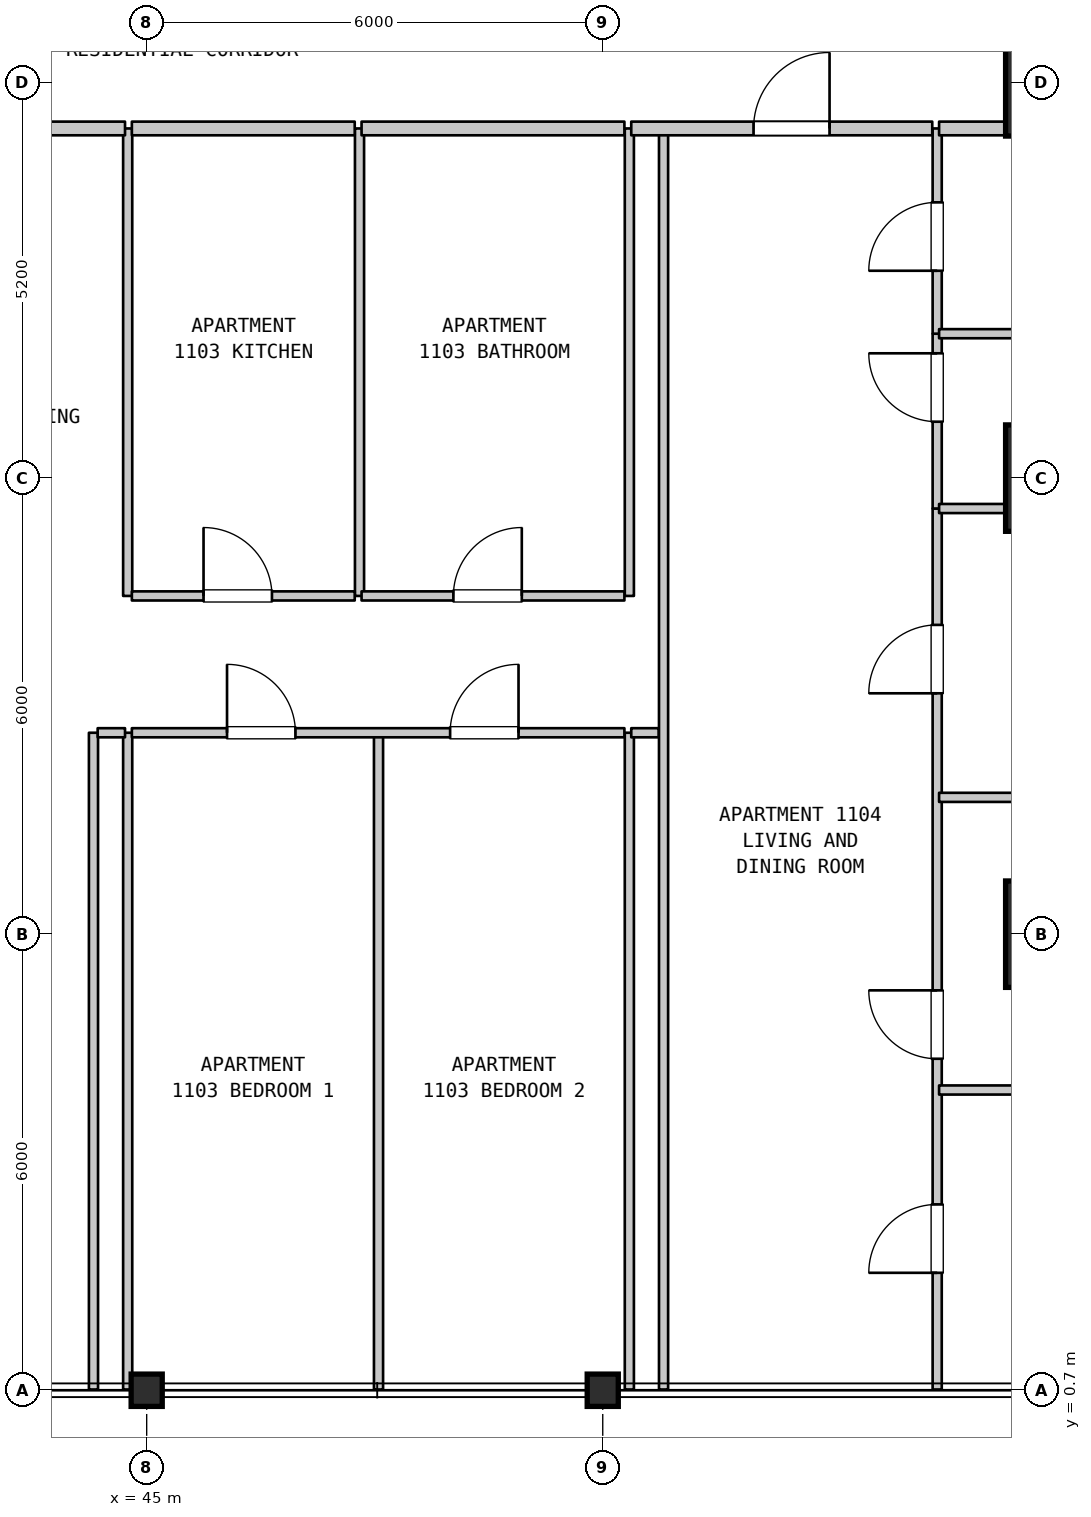
"""IFC4 building model, lengths in metres.
Left out: names, types, materials, properties, quantities, classifications, styles, units other than length and angle.
Written with IfcOpenShell. Run it as: python <this file> out.ifc"""

import sys

from ifc_helpers import new_model, si_unit, direction, frame, frame_2d, origin, origin_2d, place, context, subcontext, project, spatial, rectangle, i_section, extrude, element, fill, save


model = new_model("IFC4")
c1 = context("Model", 3, precision=1e-05, world=origin(), true_north=direction((0.0, 1.0)))
c2 = subcontext(c1, "Body", "Model", "MODEL_VIEW")
j1 = project(units=[si_unit("LENGTHUNIT", "METRE"), si_unit("PLANEANGLEUNIT", "RADIAN")], contexts=[c1])
p1 = place(None, origin())
s1 = spatial("IfcSite", under=j1, at=p1, CompositionType="ELEMENT")
p2 = place(p1, origin())
s2 = spatial("IfcBuilding", under=s1, at=p2, CompositionType="ELEMENT")
p3 = place(p2, frame((0.0, 0.0, 49.9)))
s3 = spatial("IfcBuildingStorey", under=s2, at=p3, CompositionType="ELEMENT", Elevation=49.9)
for number, where, z_axis, x_axis in (
    (1, (45.0, 0.7, 0.0), (0.0, 0.0, 1.0), (1.0, 0.0, 0.0)),
    (2, (51.0, 0.7, 0.0), (0.0, 0.0, 1.0), (1.0, 0.0, 0.0)),
):
    element("IfcColumn", number, at=place(p3, frame(where, z_axis=z_axis, x_axis=x_axis)), inside=s3, PredefinedType="COLUMN", context=c2, shape_type="SweptSolid", body=[
        extrude(i_section(OverallWidth=0.409, OverallDepth=0.425, WebThickness=0.032, FlangeThickness=0.052, FilletRadius=0.015, at=origin_2d()), origin(), (0.0, 0.0, 1.0), 3.7),
    ])
for number, where, z_axis, x_axis in (
    (3, (57.0, 6.7, 0.0), (0.0, 0.0, 1.0), (1.0, 0.0, 0.0)),
    (4, (57.0, 12.7, 0.0), (0.0, 0.0, 1.0), (1.0, 0.0, 0.0)),
    (5, (57.0, 17.9, 0.0), (0.0, 0.0, 1.0), (1.0, 0.0, 0.0)),
):
    element("IfcColumn", number, at=place(p3, frame(where, z_axis=z_axis, x_axis=x_axis)), inside=s3, PredefinedType="COLUMN", context=c2, shape_type="SweptSolid", body=[
        extrude(rectangle(XDim=1.4, YDim=1.4, at=origin_2d()), origin(), (0.0, 0.0, 1.0), 3.7),
    ])
for number, where, z_axis, x_axis in (
    (6, (44.3, 0.71, 0.0), (0.0, 0.0, 1.0), (0.0, 1.0, 0.0)),
    (7, (44.75, 0.71, 0.0), (0.0, 0.0, 1.0), (0.0, 1.0, 0.0)),
):
    element("IfcWall", number, at=place(p3, frame(where, z_axis=z_axis, x_axis=x_axis)), inside=s3, PredefinedType="PARTITIONING", context=c2, shape_type="SweptSolid", body=[
        extrude(rectangle(XDim=8.64, YDim=0.12, at=frame_2d((4.32, 0.0))), origin(), (0.0, 0.0, 1.0), 3.385),
    ])
for number, where, z_axis, x_axis in (
    (8, (44.75, 11.15, 0.0), (0.0, 0.0, 1.0), (0.0, 1.0, 0.0)),
    (9, (47.8, 11.15, 0.0), (0.0, 0.0, 1.0), (0.0, 1.0, 0.0)),
):
    element("IfcWall", number, at=place(p3, frame(where, z_axis=z_axis, x_axis=x_axis)), inside=s3, PredefinedType="PARTITIONING", context=c2, shape_type="SweptSolid", body=[
        extrude(rectangle(XDim=6.15, YDim=0.12, at=frame_2d((3.075, 0.0))), origin(), (0.0, 0.0, 1.0), 3.385),
    ])
for number, where, z_axis, x_axis in (
    (10, (48.05, 0.71, 0.0), (0.0, 0.0, 1.0), (0.0, 1.0, 0.0)),
    (11, (51.35, 0.71, 0.0), (0.0, 0.0, 1.0), (0.0, 1.0, 0.0)),
):
    element("IfcWall", number, at=place(p3, frame(where, z_axis=z_axis, x_axis=x_axis)), inside=s3, PredefinedType="PARTITIONING", context=c2, shape_type="SweptSolid", body=[
        extrude(rectangle(XDim=8.64, YDim=0.12, at=frame_2d((4.32, 0.0))), origin(), (0.0, 0.0, 1.0), 3.385),
    ])
p4 = place(p3, frame((51.35, 11.15, 0.0), z_axis=(0.0, 0.0, 1.0), x_axis=(0.0, 1.0, 0.0)))
e12 = element("IfcWall", 12, at=p4, inside=s3, PredefinedType="PARTITIONING", context=c2, shape_type="SweptSolid", body=[
    extrude(rectangle(XDim=6.15, YDim=0.12, at=frame_2d((3.075, 0.0))), origin(), (0.0, 0.0, 1.0), 3.385),
])
p5 = place(p3, frame((51.8, 0.71, 0.0), z_axis=(0.0, 0.0, 1.0), x_axis=(0.0, 1.0, 0.0)))
e13 = element("IfcWall", 13, at=p5, inside=s3, PredefinedType="PARTITIONING", context=c2, shape_type="SweptSolid", body=[
    extrude(rectangle(XDim=16.59, YDim=0.12, at=frame_2d((8.295, 0.0))), origin(), (0.0, 0.0, 1.0), 3.385),
])
p6 = place(p3, frame((55.4, 0.71, 0.0), z_axis=(0.0, 0.0, 1.0), x_axis=(0.0, 1.0, 0.0)))
e14 = element("IfcWall", 14, at=p6, inside=s3, PredefinedType="PARTITIONING", context=c2, shape_type="SweptSolid", body=[
    extrude(rectangle(XDim=11.59, YDim=0.12, at=frame_2d((5.795, 0.0))), origin(), (0.0, 0.0, 1.0), 3.385),
])
p7 = place(p6, frame((1.535, 0.0, 0.0)))
e15 = element("IfcOpeningElement", 15, at=p7, cuts=e14, PredefinedType="OPENING", context=c2, shape_type="SweptSolid", body=[
    extrude(rectangle(XDim=0.9, YDim=2.15, at=frame_2d((0.45, 1.075))), frame((0.0, 0.07, 0.0), z_axis=(0.0, -1.0, 0.0), x_axis=(1.0, 0.0, 0.0)), (0.0, 0.0, 1.0), 0.14),
])
p8 = place(p6, frame((4.351, 0.0, 0.0)))
e16 = element("IfcOpeningElement", 16, at=p8, cuts=e14, PredefinedType="OPENING", context=c2, shape_type="SweptSolid", body=[
    extrude(rectangle(XDim=0.9, YDim=2.15, at=frame_2d((0.45, 1.075))), frame((0.0, 0.07, 0.0), z_axis=(0.0, -1.0, 0.0), x_axis=(1.0, 0.0, 0.0)), (0.0, 0.0, 1.0), 0.14),
])
p9 = place(p6, frame((9.159, 0.0, 0.0)))
e17 = element("IfcOpeningElement", 17, at=p9, cuts=e14, PredefinedType="OPENING", context=c2, shape_type="SweptSolid", body=[
    extrude(rectangle(XDim=0.9, YDim=2.15, at=frame_2d((0.45, 1.075))), frame((0.0, 0.07, 0.0), z_axis=(0.0, -1.0, 0.0), x_axis=(1.0, 0.0, 0.0)), (0.0, 0.0, 1.0), 0.14),
])
p10 = place(p3, frame((55.4, 12.3, 0.0), z_axis=(0.0, 0.0, 1.0), x_axis=(0.0, 1.0, 0.0)))
e18 = element("IfcWall", 18, at=p10, inside=s3, PredefinedType="PARTITIONING", context=c2, shape_type="SweptSolid", body=[
    extrude(rectangle(XDim=2.3, YDim=0.12, at=frame_2d((1.15, 0.0))), origin(), (0.0, 0.0, 1.0), 3.385),
])
p11 = place(p10, frame((1.142, 0.0, 0.0)))
e19 = element("IfcOpeningElement", 19, at=p11, cuts=e18, PredefinedType="OPENING", context=c2, shape_type="SweptSolid", body=[
    extrude(rectangle(XDim=0.9, YDim=2.15, at=frame_2d((0.45, 1.075))), frame((0.0, 0.07, 0.0), z_axis=(0.0, -1.0, 0.0), x_axis=(1.0, 0.0, 0.0)), (0.0, 0.0, 1.0), 0.14),
])
p12 = place(p3, frame((55.4, 14.6, 0.0), z_axis=(0.0, 0.0, 1.0), x_axis=(0.0, 1.0, 0.0)))
e20 = element("IfcWall", 20, at=p12, inside=s3, PredefinedType="PARTITIONING", context=c2, shape_type="SweptSolid", body=[
    extrude(rectangle(XDim=2.7, YDim=0.12, at=frame_2d((1.35, 0.0))), origin(), (0.0, 0.0, 1.0), 3.385),
])
p13 = place(p12, frame((0.828, 0.0, 0.0)))
e21 = element("IfcOpeningElement", 21, at=p13, cuts=e20, PredefinedType="OPENING", context=c2, shape_type="SweptSolid", body=[
    extrude(rectangle(XDim=0.9, YDim=2.1, at=frame_2d((0.45, 1.05))), frame((0.0, 0.07, 0.0), z_axis=(0.0, -1.0, 0.0), x_axis=(1.0, 0.0, 0.0)), (0.0, 0.0, 1.0), 0.14),
])
for number, where, z_axis, x_axis in (
    (22, (55.425, 4.65, 0.0), (0.0, 0.0, 1.0), (1.0, 0.0, 0.0)),
    (23, (55.425, 8.5, 0.0), (0.0, 0.0, 1.0), (1.0, 0.0, 0.0)),
):
    element("IfcWall", number, at=place(p3, frame(where, z_axis=z_axis, x_axis=x_axis)), inside=s3, PredefinedType="PARTITIONING", context=c2, shape_type="SweptSolid", body=[
        extrude(rectangle(XDim=6.16, YDim=0.12, at=frame_2d((3.08, 0.0))), origin(), (0.0, 0.0, 1.0), 3.385),
    ])
p14 = place(p3, frame((44.355, 9.35, 0.0), z_axis=(0.0, 0.0, 1.0), x_axis=(1.0, 0.0, 0.0)))
e24 = element("IfcWall", 24, at=p14, inside=s3, PredefinedType="PARTITIONING", context=c2, shape_type="SweptSolid", body=[
    extrude(rectangle(XDim=0.36, YDim=0.12, at=frame_2d((0.18, 0.0))), origin(), (0.0, 0.0, 1.0), 3.385),
])
p15 = place(p3, frame((44.805, 9.35, 0.0), z_axis=(0.0, 0.0, 1.0), x_axis=(1.0, 0.0, 0.0)))
e25 = element("IfcWall", 25, at=p15, inside=s3, PredefinedType="PARTITIONING", context=c2, shape_type="SweptSolid", body=[
    extrude(rectangle(XDim=6.48, YDim=0.12, at=frame_2d((3.24, 0.0))), origin(), (0.0, 0.0, 1.0), 3.385),
])
p16 = place(p15, frame((1.252, 0.0, 0.0)))
e26 = element("IfcOpeningElement", 26, at=p16, cuts=e25, PredefinedType="OPENING", context=c2, shape_type="SweptSolid", body=[
    extrude(rectangle(XDim=0.9, YDim=2.15, at=frame_2d((0.45, 1.075))), frame((0.0, 0.07, 0.0), z_axis=(0.0, -1.0, 0.0), x_axis=(1.0, 0.0, 0.0)), (0.0, 0.0, 1.0), 0.14),
])
p17 = place(p15, frame((4.187, 0.0, 0.0)))
e27 = element("IfcOpeningElement", 27, at=p17, cuts=e25, PredefinedType="OPENING", context=c2, shape_type="SweptSolid", body=[
    extrude(rectangle(XDim=0.9, YDim=2.15, at=frame_2d((0.45, 1.075))), frame((0.0, 0.07, 0.0), z_axis=(0.0, -1.0, 0.0), x_axis=(1.0, 0.0, 0.0)), (0.0, 0.0, 1.0), 0.14),
])
p18 = place(p3, frame((51.375, 9.35, 0.0), z_axis=(0.0, 0.0, 1.0), x_axis=(1.0, 0.0, 0.0)))
e28 = element("IfcWall", 28, at=p18, inside=s3, PredefinedType="PARTITIONING", context=c2, shape_type="SweptSolid", body=[
    extrude(rectangle(XDim=0.36, YDim=0.12, at=frame_2d((0.18, 0.0))), origin(), (0.0, 0.0, 1.0), 3.385),
])
p19 = place(p3, frame((44.805, 11.15, 0.0), z_axis=(0.0, 0.0, 1.0), x_axis=(1.0, 0.0, 0.0)))
e29 = element("IfcWall", 29, at=p19, inside=s3, PredefinedType="PARTITIONING", context=c2, shape_type="SweptSolid", body=[
    extrude(rectangle(XDim=2.932, YDim=0.12, at=frame_2d((1.466, 0.0))), origin(), (0.0, 0.0, 1.0), 3.385),
])
p20 = place(p19, frame((0.943, 0.0, 0.0)))
e30 = element("IfcOpeningElement", 30, at=p20, cuts=e29, PredefinedType="OPENING", context=c2, shape_type="SweptSolid", body=[
    extrude(rectangle(XDim=0.9, YDim=2.15, at=frame_2d((0.45, 1.075))), frame((0.0, 0.07, 0.0), z_axis=(0.0, -1.0, 0.0), x_axis=(1.0, 0.0, 0.0)), (0.0, 0.0, 1.0), 0.14),
])
p21 = place(p3, frame((47.827, 11.15, 0.0), z_axis=(0.0, 0.0, 1.0), x_axis=(1.0, 0.0, 0.0)))
e31 = element("IfcWall", 31, at=p21, inside=s3, PredefinedType="PARTITIONING", context=c2, shape_type="SweptSolid", body=[
    extrude(rectangle(XDim=3.458, YDim=0.12, at=frame_2d((1.729, 0.0))), origin(), (0.0, 0.0, 1.0), 3.385),
])
p22 = place(p21, frame((1.208, 0.0, 0.0)))
e32 = element("IfcOpeningElement", 32, at=p22, cuts=e31, PredefinedType="OPENING", context=c2, shape_type="SweptSolid", body=[
    extrude(rectangle(XDim=0.9, YDim=2.1, at=frame_2d((0.45, 1.05))), frame((0.0, 0.07, 0.0), z_axis=(0.0, -1.0, 0.0), x_axis=(1.0, 0.0, 0.0)), (0.0, 0.0, 1.0), 0.14),
])
for number, where, z_axis, x_axis in (
    (33, (55.425, 12.3, 0.0), (0.0, 0.0, 1.0), (1.0, 0.0, 0.0)),
    (34, (55.425, 14.6, 0.0), (0.0, 0.0, 1.0), (1.0, 0.0, 0.0)),
):
    element("IfcWall", number, at=place(p3, frame(where, z_axis=z_axis, x_axis=x_axis)), inside=s3, PredefinedType="PARTITIONING", context=c2, shape_type="SweptSolid", body=[
        extrude(rectangle(XDim=6.16, YDim=0.12, at=frame_2d((3.08, 0.0))), origin(), (0.0, 0.0, 1.0), 3.385),
    ])
p23 = place(p3, frame((39.885, 17.3, 0.0), z_axis=(0.0, 0.0, 1.0), x_axis=(1.0, 0.0, 0.0)))
e35 = element("IfcWall", 35, at=p23, inside=s3, PredefinedType="STANDARD", context=c2, shape_type="SweptSolid", body=[
    extrude(rectangle(XDim=4.83, YDim=0.18, at=frame_2d((2.415, 0.0))), origin(), (0.0, 0.0, 1.0), 3.385),
])
p24 = place(p23, frame((2.043, 0.0, 0.0)))
e36 = element("IfcOpeningElement", 36, at=p24, cuts=e35, PredefinedType="OPENING", context=c2, shape_type="SweptSolid", body=[
    extrude(rectangle(XDim=1.0, YDim=2.15, at=frame_2d((0.5, 1.075))), frame((0.0, 0.1, 0.0), z_axis=(0.0, -1.0, 0.0), x_axis=(1.0, 0.0, 0.0)), (0.0, 0.0, 1.0), 0.2),
])
p25 = place(p3, frame((44.805, 17.3, 0.0), z_axis=(0.0, 0.0, 1.0), x_axis=(1.0, 0.0, 0.0)))
e37 = element("IfcWall", 37, at=p25, inside=s3, PredefinedType="STANDARD", context=c2, shape_type="SweptSolid", body=[
    extrude(rectangle(XDim=2.932, YDim=0.18, at=frame_2d((1.466, 0.0))), origin(), (0.0, 0.0, 1.0), 3.385),
])
p26 = place(p3, frame((47.827, 17.3, 0.0), z_axis=(0.0, 0.0, 1.0), x_axis=(1.0, 0.0, 0.0)))
e38 = element("IfcWall", 38, at=p26, inside=s3, PredefinedType="STANDARD", context=c2, shape_type="SweptSolid", body=[
    extrude(rectangle(XDim=3.458, YDim=0.18, at=frame_2d((1.729, 0.0))), origin(), (0.0, 0.0, 1.0), 3.385),
])
p27 = place(p3, frame((51.375, 17.3, 0.0), z_axis=(0.0, 0.0, 1.0), x_axis=(1.0, 0.0, 0.0)))
e39 = element("IfcWall", 39, at=p27, inside=s3, PredefinedType="STANDARD", context=c2, shape_type="SweptSolid", body=[
    extrude(rectangle(XDim=3.96, YDim=0.18, at=frame_2d((1.98, 0.0))), origin(), (0.0, 0.0, 1.0), 3.385),
])
p28 = place(p27, frame((1.609, 0.0, 0.0)))
e40 = element("IfcOpeningElement", 40, at=p28, cuts=e39, PredefinedType="OPENING", context=c2, shape_type="SweptSolid", body=[
    extrude(rectangle(XDim=1.0, YDim=2.15, at=frame_2d((0.5, 1.075))), frame((0.0, 0.1, 0.0), z_axis=(0.0, -1.0, 0.0), x_axis=(1.0, 0.0, 0.0)), (0.0, 0.0, 1.0), 0.2),
])
p29 = place(p3, frame((55.425, 17.3, 0.0), z_axis=(0.0, 0.0, 1.0), x_axis=(1.0, 0.0, 0.0)))
e41 = element("IfcWall", 41, at=p29, inside=s3, PredefinedType="STANDARD", context=c2, shape_type="SweptSolid", body=[
    extrude(rectangle(XDim=6.16, YDim=0.18, at=frame_2d((3.08, 0.0))), origin(), (0.0, 0.0, 1.0), 3.385),
])
p30 = place(p7, origin())
e42 = element("IfcDoor", 42, at=p30, inside=s3, OperationType="SINGLE_SWING_LEFT", PredefinedType="DOOR", context=c2, shape_type="SweptSolid", body=[
    extrude(rectangle(XDim=0.9, YDim=2.15, at=frame_2d((0.45, 1.075))), frame((0.0, 0.025, 0.0), z_axis=(0.0, -1.0, 0.0), x_axis=(1.0, 0.0, 0.0)), (0.0, 0.0, 1.0), 0.05),
])
fill(e15, e42)
p31 = place(p8, origin())
e43 = element("IfcDoor", 43, at=p31, inside=s3, OperationType="SINGLE_SWING_RIGHT", PredefinedType="DOOR", context=c2, shape_type="SweptSolid", body=[
    extrude(rectangle(XDim=0.9, YDim=2.15, at=frame_2d((0.45, 1.075))), frame((0.0, 0.025, 0.0), z_axis=(0.0, -1.0, 0.0), x_axis=(1.0, 0.0, 0.0)), (0.0, 0.0, 1.0), 0.05),
])
fill(e16, e43)
p32 = place(p9, origin())
e44 = element("IfcDoor", 44, at=p32, inside=s3, OperationType="SINGLE_SWING_LEFT", PredefinedType="DOOR", context=c2, shape_type="SweptSolid", body=[
    extrude(rectangle(XDim=0.9, YDim=2.15, at=frame_2d((0.45, 1.075))), frame((0.0, 0.025, 0.0), z_axis=(0.0, -1.0, 0.0), x_axis=(1.0, 0.0, 0.0)), (0.0, 0.0, 1.0), 0.05),
])
fill(e17, e44)
p33 = place(p11, origin())
e45 = element("IfcDoor", 45, at=p33, inside=s3, OperationType="SINGLE_SWING_RIGHT", PredefinedType="DOOR", context=c2, shape_type="SweptSolid", body=[
    extrude(rectangle(XDim=0.9, YDim=2.15, at=frame_2d((0.45, 1.075))), frame((0.0, 0.025, 0.0), z_axis=(0.0, -1.0, 0.0), x_axis=(1.0, 0.0, 0.0)), (0.0, 0.0, 1.0), 0.05),
])
fill(e19, e45)
p34 = place(p13, origin())
e46 = element("IfcDoor", 46, at=p34, inside=s3, OperationType="SINGLE_SWING_LEFT", PredefinedType="DOOR", context=c2, shape_type="SweptSolid", body=[
    extrude(rectangle(XDim=0.9, YDim=2.1, at=frame_2d((0.45, 1.05))), frame((0.0, 0.025, 0.0), z_axis=(0.0, -1.0, 0.0), x_axis=(1.0, 0.0, 0.0)), (0.0, 0.0, 1.0), 0.05),
])
fill(e21, e46)
p35 = place(p16, origin())
e47 = element("IfcDoor", 47, at=p35, inside=s3, OperationType="SINGLE_SWING_LEFT", PredefinedType="DOOR", context=c2, shape_type="SweptSolid", body=[
    extrude(rectangle(XDim=0.9, YDim=2.15, at=frame_2d((0.45, 1.075))), frame((0.0, 0.025, 0.0), z_axis=(0.0, -1.0, 0.0), x_axis=(1.0, 0.0, 0.0)), (0.0, 0.0, 1.0), 0.05),
])
fill(e26, e47)
p36 = place(p17, origin())
e48 = element("IfcDoor", 48, at=p36, inside=s3, OperationType="SINGLE_SWING_RIGHT", PredefinedType="DOOR", context=c2, shape_type="SweptSolid", body=[
    extrude(rectangle(XDim=0.9, YDim=2.15, at=frame_2d((0.45, 1.075))), frame((0.0, 0.025, 0.0), z_axis=(0.0, -1.0, 0.0), x_axis=(1.0, 0.0, 0.0)), (0.0, 0.0, 1.0), 0.05),
])
fill(e27, e48)
p37 = place(p20, origin())
e49 = element("IfcDoor", 49, at=p37, inside=s3, OperationType="SINGLE_SWING_LEFT", PredefinedType="DOOR", context=c2, shape_type="SweptSolid", body=[
    extrude(rectangle(XDim=0.9, YDim=2.15, at=frame_2d((0.45, 1.075))), frame((0.0, 0.025, 0.0), z_axis=(0.0, -1.0, 0.0), x_axis=(1.0, 0.0, 0.0)), (0.0, 0.0, 1.0), 0.05),
])
fill(e30, e49)
p38 = place(p22, origin())
e50 = element("IfcDoor", 50, at=p38, inside=s3, OperationType="SINGLE_SWING_RIGHT", PredefinedType="DOOR", context=c2, shape_type="SweptSolid", body=[
    extrude(rectangle(XDim=0.9, YDim=2.1, at=frame_2d((0.45, 1.05))), frame((0.0, 0.025, 0.0), z_axis=(0.0, -1.0, 0.0), x_axis=(1.0, 0.0, 0.0)), (0.0, 0.0, 1.0), 0.05),
])
fill(e32, e50)
p39 = place(p28, origin())
e51 = element("IfcDoor", 51, at=p39, inside=s3, OperationType="SINGLE_SWING_RIGHT", PredefinedType="DOOR", context=c2, shape_type="SweptSolid", body=[
    extrude(rectangle(XDim=1.0, YDim=2.15, at=frame_2d((0.5, 1.075))), frame((0.0, 0.025, 0.0), z_axis=(0.0, -1.0, 0.0), x_axis=(1.0, 0.0, 0.0)), (0.0, 0.0, 1.0), 0.05),
])
fill(e40, e51)
save(model, sys.argv[1])
